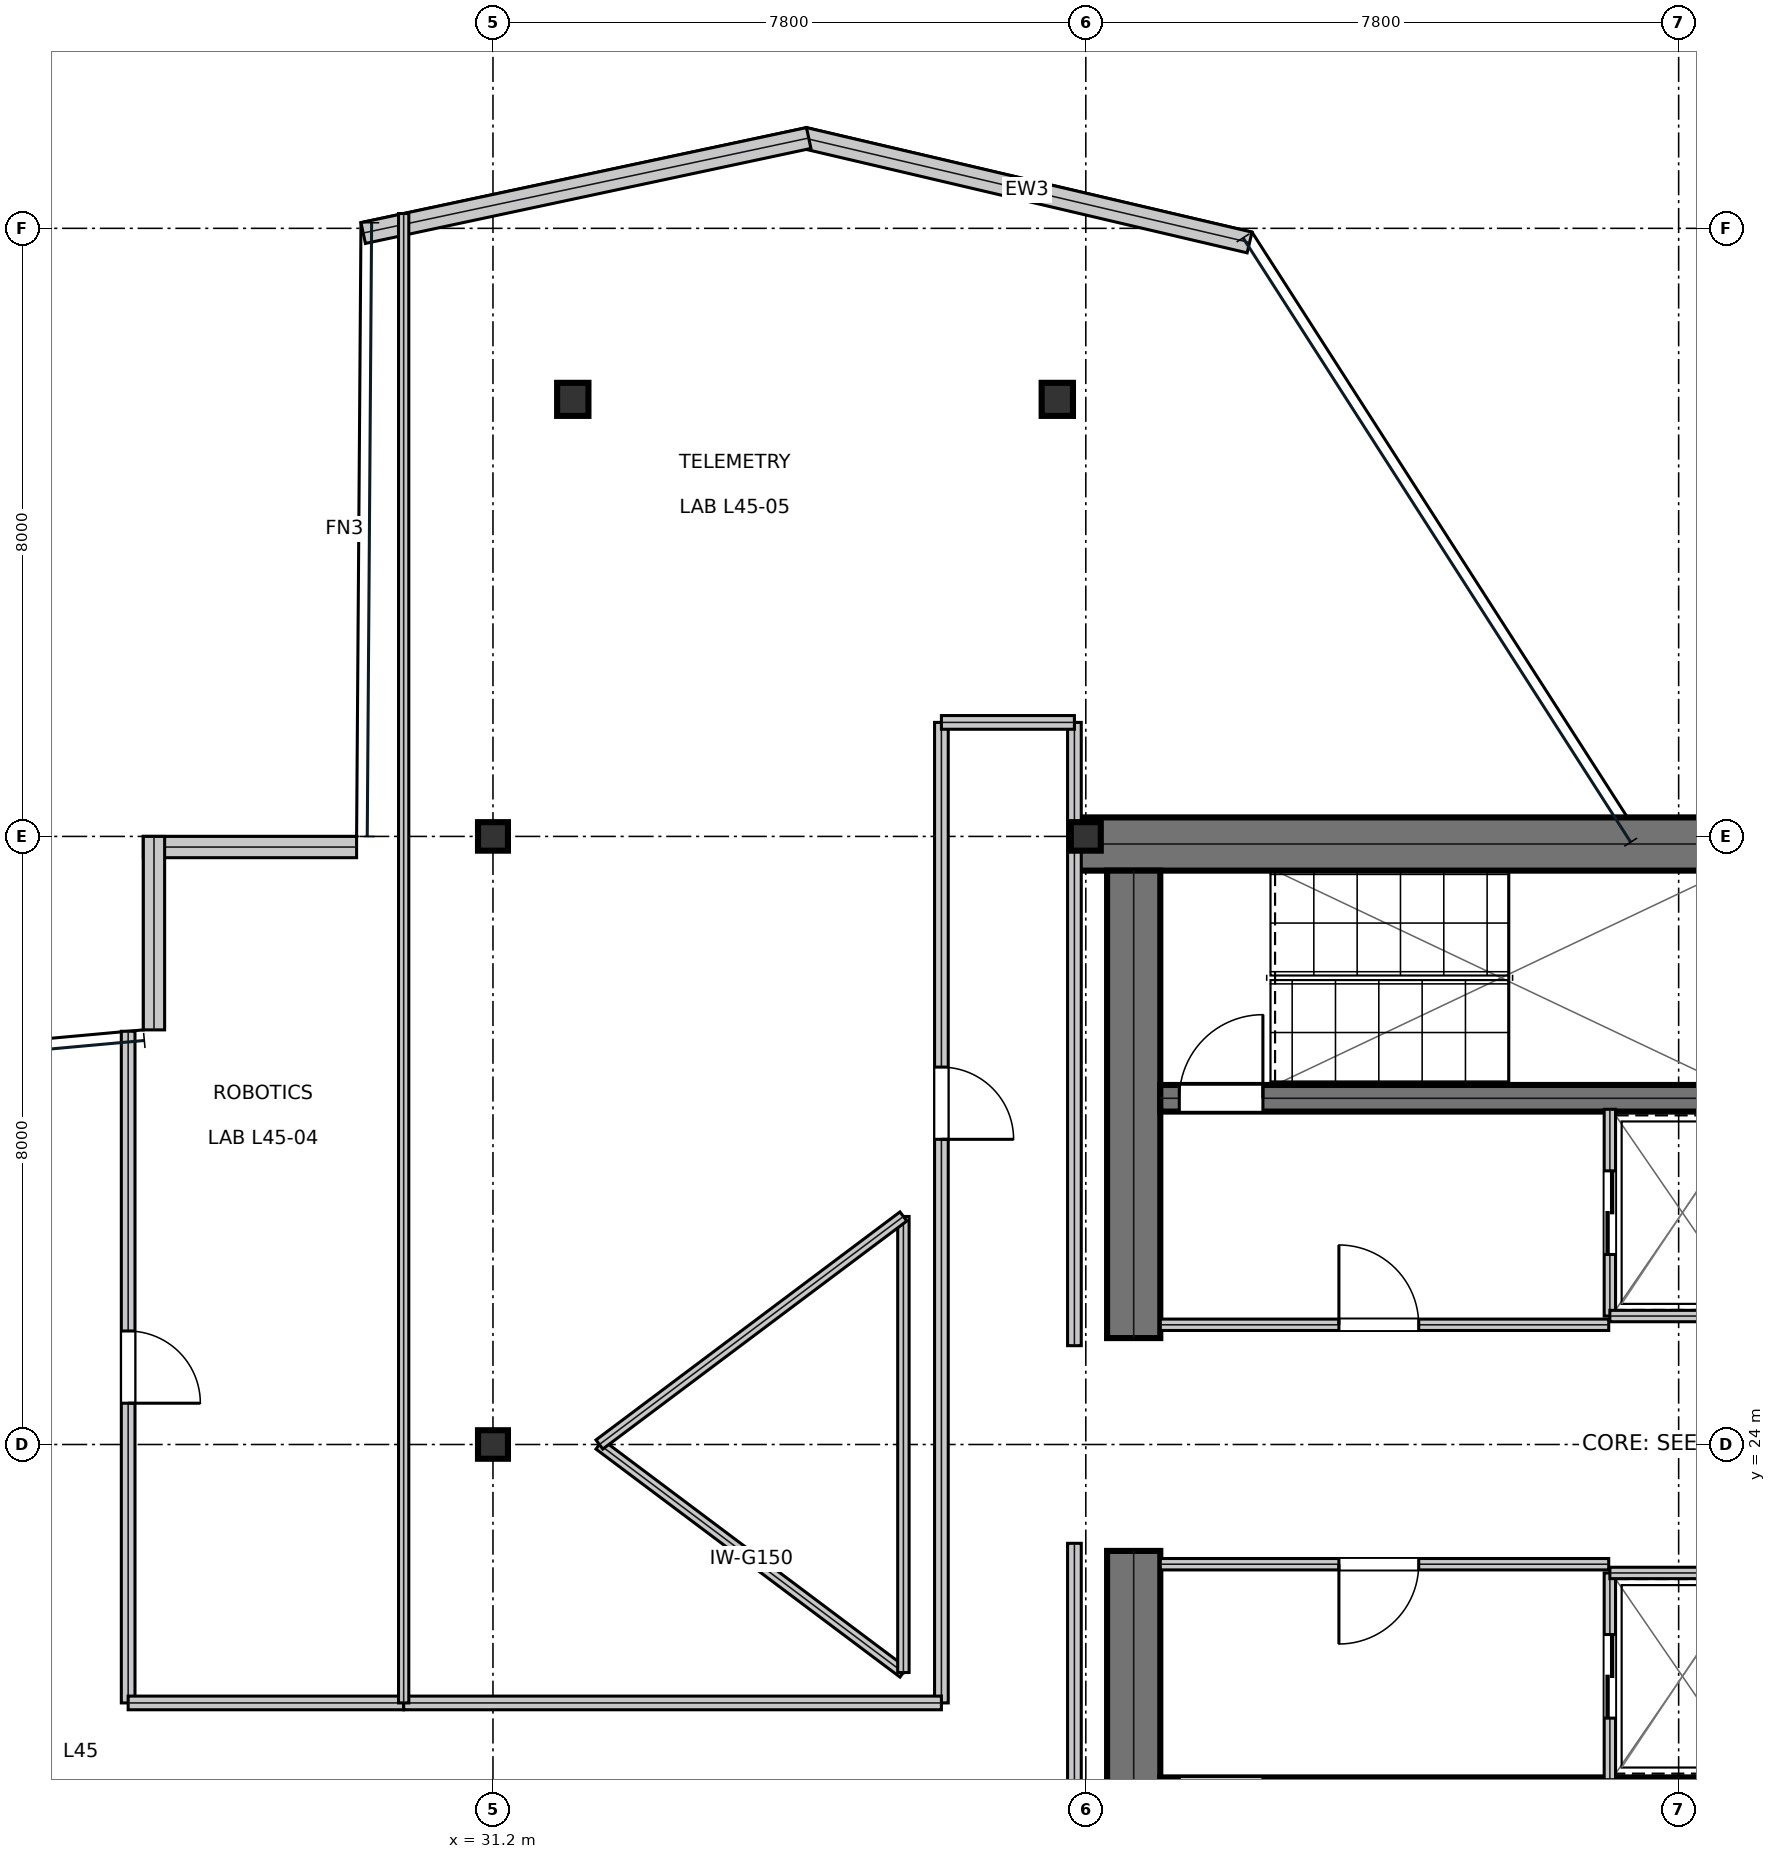
"""IFC4 building model, lengths in metres.
Left out: names, types, materials, properties, quantities, classifications, styles, units other than length and angle.
Written with IfcOpenShell. Run it as: python <this file> out.ifc"""

import sys

from ifc_helpers import new_model, si_unit, direction, frame, frame_2d, origin, origin_2d, place, context, subcontext, project, spatial, rectangle, i_section, extrude, element, fill, save


model = new_model("IFC4")
c1 = context("Model", 3, precision=1e-05, world=origin(), true_north=direction((0.0, 1.0)))
c2 = subcontext(c1, "Body", "Model", "MODEL_VIEW")
j1 = project(units=[si_unit("LENGTHUNIT", "METRE"), si_unit("PLANEANGLEUNIT", "RADIAN")], contexts=[c1])
p1 = place(None, origin())
s1 = spatial("IfcSite", under=j1, at=p1, CompositionType="ELEMENT")
p2 = place(p1, origin())
s2 = spatial("IfcBuilding", under=s1, at=p2, CompositionType="ELEMENT")
p3 = place(p2, frame((0.0, 0.0, 195.9)))
s3 = spatial("IfcBuildingStorey", under=s2, at=p3, CompositionType="ELEMENT", Elevation=195.9)
p4 = place(p3, frame((38.8, 31.9, 0.0), z_axis=(0.0, 0.0, 1.0), x_axis=(1.0, 0.0, 0.0)))
e1 = element("IfcWall", 1, at=p4, inside=s3, PredefinedType="SHEAR", context=c2, shape_type="SweptSolid", body=[
    extrude(rectangle(XDim=16.0, YDim=0.7, at=frame_2d((8.0, 0.0))), origin(), (0.0, 0.0, 1.0), 3.79),
])
for number, where, z_axis, x_axis in (
    (2, (39.63, 16.45, 0.0), (0.0, 0.0, 1.0), (0.0, 1.0, 0.0)),
    (3, (39.63, 25.4, 0.0), (0.0, 0.0, 1.0), (0.0, 1.0, 0.0)),
):
    element("IfcWall", number, at=place(p3, frame(where, z_axis=z_axis, x_axis=x_axis)), inside=s3, PredefinedType="SHEAR", context=c2, shape_type="SweptSolid", body=[
        extrude(rectangle(XDim=6.15, YDim=0.7, at=frame_2d((3.075, 0.0))), origin(), (0.0, 0.0, 1.0), 3.79),
    ])
p5 = place(p3, frame((39.98, 28.555, 0.0), z_axis=(0.0, 0.0, 1.0), x_axis=(1.0, 0.0, 0.0)))
e4 = element("IfcWall", 4, at=p5, inside=s3, PredefinedType="SHEAR", context=c2, shape_type="SweptSolid", body=[
    extrude(rectangle(XDim=7.71, YDim=0.35, at=frame_2d((3.855, 0.0))), origin(), (0.0, 0.0, 1.0), 3.79),
])
p6 = place(p5, frame((0.25, 0.0, 0.0)))
e5 = element("IfcOpeningElement", 5, at=p6, cuts=e4, PredefinedType="OPENING", context=c2, shape_type="SweptSolid", body=[
    extrude(rectangle(XDim=1.1, YDim=2.15, at=frame_2d((0.55, 1.075))), frame((0.0, 0.185, 0.0), z_axis=(0.0, -1.0, 0.0), x_axis=(1.0, 0.0, 0.0)), (0.0, 0.0, 1.0), 0.37),
])
p7 = place(p3, frame((39.98, 19.445, 0.0), z_axis=(0.0, 0.0, 1.0), x_axis=(1.0, 0.0, 0.0)))
e6 = element("IfcWall", 6, at=p7, inside=s3, PredefinedType="SHEAR", context=c2, shape_type="SweptSolid", body=[
    extrude(rectangle(XDim=7.71, YDim=0.35, at=frame_2d((3.855, 0.0))), origin(), (0.0, 0.0, 1.0), 3.79),
])
p8 = place(p7, frame((0.25, 0.0, 0.0)))
e7 = element("IfcOpeningElement", 7, at=p8, cuts=e6, PredefinedType="OPENING", context=c2, shape_type="SweptSolid", body=[
    extrude(rectangle(XDim=1.1, YDim=2.15, at=frame_2d((0.55, 1.075))), frame((0.0, 0.185, 0.0), z_axis=(0.0, -1.0, 0.0), x_axis=(1.0, 0.0, 0.0)), (0.0, 0.0, 1.0), 0.37),
])
for number, where, z_axis, x_axis in (
    (8, (31.2, 24.0, 0.0), (0.0, 0.0, 1.0), (1.0, 0.0, 0.0)),
    (9, (31.2, 32.0, 0.0), (0.0, 0.0, 1.0), (1.0, 0.0, 0.0)),
    (10, (39.0, 32.0, 0.0), (0.0, 0.0, 1.0), (1.0, 0.0, 0.0)),
):
    element("IfcColumn", number, at=place(p3, frame(where, z_axis=z_axis, x_axis=x_axis)), inside=s3, PredefinedType="COLUMN", context=c2, shape_type="SweptSolid", body=[
        extrude(i_section(OverallWidth=0.394, OverallDepth=0.375, WebThickness=0.017, FlangeThickness=0.028, at=origin_2d()), origin(), (0.0, 0.0, 1.0), 4.044),
    ])
for number, where, z_axis, x_axis in (
    (11, (32.25, 37.75, 0.016), (0.0, 0.0, 1.0), (1.0, 0.0, 0.0)),
    (12, (38.625, 37.75, 0.016), (0.0, 0.0, 1.0), (1.0, 0.0, 0.0)),
):
    element("IfcColumn", number, at=place(p3, frame(where, z_axis=z_axis, x_axis=x_axis)), inside=s3, PredefinedType="COLUMN", context=c2, shape_type="SweptSolid", body=[
        extrude(i_section(OverallWidth=0.412, OverallDepth=0.435, WebThickness=0.036, FlangeThickness=0.058, at=origin_2d()), origin(), (0.0, 0.0, 1.0), 4.018),
    ])
p9 = place(p3, frame((41.155, 39.814, 0.0), z_axis=(0.0, 0.0, 1.0), x_axis=(-0.973574347184, 0.228370292517, 0.0)))
e13 = element("IfcWall", 13, at=p9, inside=s3, PredefinedType="STANDARD", context=c2, shape_type="SweptSolid", body=[
    extrude(rectangle(XDim=6.021, YDim=0.28, at=frame_2d((3.01, 0.0))), origin(), (0.0, 0.0, 1.0), 3.79),
])
p10 = place(p3, frame((35.354, 41.188, 0.0), z_axis=(0.0, 0.0, 1.0), x_axis=(-0.978010564176, -0.208555355626, 0.0)))
e14 = element("IfcWall", 14, at=p10, inside=s3, PredefinedType="STANDARD", context=c2, shape_type="SweptSolid", body=[
    extrude(rectangle(XDim=5.994, YDim=0.28, at=frame_2d((2.997, 0.0))), origin(), (0.0, 0.0, 1.0), 3.79),
])
p11 = place(p3, frame((29.406, 31.86, 0.0), z_axis=(0.0, 0.0, 1.0), x_axis=(-1.0, 0.0, 0.0)))
e15 = element("IfcWall", 15, at=p11, inside=s3, PredefinedType="STANDARD", context=c2, shape_type="SweptSolid", body=[
    extrude(rectangle(XDim=2.806, YDim=0.28, at=frame_2d((1.403, 0.0))), origin(), (0.0, 0.0, 1.0), 3.79),
])
p12 = place(p3, frame((26.74, 32.0, 0.0), z_axis=(0.0, 0.0, 1.0), x_axis=(0.0, -1.0, 0.0)))
e16 = element("IfcWall", 16, at=p12, inside=s3, PredefinedType="STANDARD", context=c2, shape_type="SweptSolid", body=[
    extrude(rectangle(XDim=2.545, YDim=0.28, at=frame_2d((1.273, 0.0))), origin(), (0.0, 0.0, 1.0), 3.319),
])
p13 = place(p3, frame((39.98, 25.575, 0.0), z_axis=(0.0, 0.0, 1.0), x_axis=(1.0, 0.0, 0.0)))
e17 = element("IfcWall", 17, at=p13, inside=s3, PredefinedType="PARTITIONING", context=c2, shape_type="SweptSolid", body=[
    extrude(rectangle(XDim=5.9, YDim=0.15, at=frame_2d((2.95, 0.0))), origin(), (0.0, 0.0, 1.0), 3.79),
])
p14 = place(p13, frame((2.35, 0.0, 0.0)))
e18 = element("IfcOpeningElement", 18, at=p14, cuts=e17, PredefinedType="OPENING", context=c2, shape_type="SweptSolid", body=[
    extrude(rectangle(XDim=1.05, YDim=2.15, at=frame_2d((0.525, 1.075))), frame((0.0, 0.085, 0.0), z_axis=(0.0, -1.0, 0.0), x_axis=(1.0, 0.0, 0.0)), (0.0, 0.0, 1.0), 0.17),
])
p15 = place(p3, frame((39.98, 22.425, 0.0), z_axis=(0.0, 0.0, 1.0), x_axis=(1.0, 0.0, 0.0)))
e19 = element("IfcWall", 19, at=p15, inside=s3, PredefinedType="PARTITIONING", context=c2, shape_type="SweptSolid", body=[
    extrude(rectangle(XDim=5.9, YDim=0.15, at=frame_2d((2.95, 0.0))), origin(), (0.0, 0.0, 1.0), 3.79),
])
p16 = place(p15, frame((2.35, 0.0, 0.0)))
e20 = element("IfcOpeningElement", 20, at=p16, cuts=e19, PredefinedType="OPENING", context=c2, shape_type="SweptSolid", body=[
    extrude(rectangle(XDim=1.05, YDim=2.15, at=frame_2d((0.525, 1.075))), frame((0.0, 0.085, 0.0), z_axis=(0.0, -1.0, 0.0), x_axis=(1.0, 0.0, 0.0)), (0.0, 0.0, 1.0), 0.17),
])
p17 = place(p3, frame((45.895, 25.69, 0.0), z_axis=(0.0, 0.0, 1.0), x_axis=(0.0, 1.0, 0.0)))
e21 = element("IfcWall", 21, at=p17, inside=s3, PredefinedType="PARTITIONING", context=c2, shape_type="SweptSolid", body=[
    extrude(rectangle(XDim=2.72, YDim=0.15, at=frame_2d((1.36, 0.0))), origin(), (0.0, 0.0, 1.0), 3.79),
])
p18 = place(p17, frame((0.81, 0.0, 0.0)))
e22 = element("IfcOpeningElement", 22, at=p18, cuts=e21, PredefinedType="OPENING", context=c2, shape_type="SweptSolid", body=[
    extrude(rectangle(XDim=1.1, YDim=2.15, at=frame_2d((0.55, 1.075))), frame((0.0, 0.085, 0.0), z_axis=(0.0, -1.0, 0.0), x_axis=(1.0, 0.0, 0.0)), (0.0, 0.0, 1.0), 0.17),
])
p19 = place(p3, frame((45.895, 25.69, 0.0), z_axis=(0.0, 0.0, 1.0), x_axis=(1.0, 0.0, 0.0)))
e23 = element("IfcWall", 23, at=p19, inside=s3, PredefinedType="PARTITIONING", context=c2, shape_type="SweptSolid", body=[
    extrude(rectangle(XDim=1.915, YDim=0.15, at=frame_2d((0.958, 0.0))), origin(), (0.0, 0.0, 1.0), 3.79),
])
p20 = place(p3, frame((45.895, 19.59, 0.0), z_axis=(0.0, 0.0, 1.0), x_axis=(0.0, 1.0, 0.0)))
e24 = element("IfcWall", 24, at=p20, inside=s3, PredefinedType="PARTITIONING", context=c2, shape_type="SweptSolid", body=[
    extrude(rectangle(XDim=2.72, YDim=0.15, at=frame_2d((1.36, 0.0))), origin(), (0.0, 0.0, 1.0), 3.79),
])
p21 = place(p20, frame((0.81, 0.0, 0.0)))
e25 = element("IfcOpeningElement", 25, at=p21, cuts=e24, PredefinedType="OPENING", context=c2, shape_type="SweptSolid", body=[
    extrude(rectangle(XDim=1.1, YDim=2.15, at=frame_2d((0.55, 1.075))), frame((0.0, 0.085, 0.0), z_axis=(0.0, -1.0, 0.0), x_axis=(1.0, 0.0, 0.0)), (0.0, 0.0, 1.0), 0.17),
])
p22 = place(p3, frame((45.895, 22.31, 0.0), z_axis=(0.0, 0.0, 1.0), x_axis=(1.0, 0.0, 0.0)))
e26 = element("IfcWall", 26, at=p22, inside=s3, PredefinedType="PARTITIONING", context=c2, shape_type="SweptSolid", body=[
    extrude(rectangle(XDim=1.915, YDim=0.15, at=frame_2d((0.958, 0.0))), origin(), (0.0, 0.0, 1.0), 3.79),
])
p23 = place(p3, frame((26.4, 20.6, 0.0), z_axis=(0.0, 0.0, 1.0), x_axis=(0.0, 1.0, 0.0)))
e27 = element("IfcWall", 27, at=p23, inside=s3, PredefinedType="SOLIDWALL", context=c2, shape_type="SweptSolid", body=[
    extrude(rectangle(XDim=8.836, YDim=0.18, at=frame_2d((4.418, 0.0))), origin(), (0.0, 0.0, 1.0), 3.241),
])
p24 = place(p23, frame((3.943, 0.0, 0.0)))
e28 = element("IfcOpeningElement", 28, at=p24, cuts=e27, PredefinedType="OPENING", context=c2, shape_type="SweptSolid", body=[
    extrude(rectangle(XDim=0.95, YDim=2.15, at=frame_2d((0.475, 1.075))), frame((0.0, 0.1, 0.0), z_axis=(0.0, -1.0, 0.0), x_axis=(1.0, 0.0, 0.0)), (0.0, 0.0, 1.0), 0.2),
])
p25 = place(p3, frame((37.1, 20.6, 0.0), z_axis=(0.0, 0.0, 1.0), x_axis=(0.0, 1.0, 0.0)))
e29 = element("IfcWall", 29, at=p25, inside=s3, PredefinedType="SOLIDWALL", context=c2, shape_type="SweptSolid", body=[
    extrude(rectangle(XDim=12.9, YDim=0.18, at=frame_2d((6.45, 0.0))), origin(), (0.0, 0.0, 1.0), 3.241),
])
p26 = place(p25, frame((7.415, 0.0, 0.0)))
e30 = element("IfcOpeningElement", 30, at=p26, cuts=e29, PredefinedType="OPENING", context=c2, shape_type="SweptSolid", body=[
    extrude(rectangle(XDim=0.95, YDim=2.15, at=frame_2d((0.475, 1.075))), frame((0.0, 0.1, 0.0), z_axis=(0.0, -1.0, 0.0), x_axis=(1.0, 0.0, 0.0)), (0.0, 0.0, 1.0), 0.2),
])
p27 = place(p3, frame((38.85, 14.5, 0.0), z_axis=(0.0, 0.0, 1.0), x_axis=(0.0, 1.0, 0.0)))
e31 = element("IfcWall", 31, at=p27, inside=s3, PredefinedType="SOLIDWALL", context=c2, shape_type="SweptSolid", body=[
    extrude(rectangle(XDim=8.2, YDim=0.18, at=frame_2d((4.1, 0.0))), origin(), (0.0, 0.0, 1.0), 3.241),
])
p28 = place(p3, frame((26.4, 20.6, 0.0), z_axis=(0.0, 0.0, 1.0), x_axis=(1.0, 0.0, 0.0)))
e32 = element("IfcWall", 32, at=p28, inside=s3, PredefinedType="SOLIDWALL", context=c2, shape_type="SweptSolid", body=[
    extrude(rectangle(XDim=3.625, YDim=0.18, at=frame_2d((1.812, 0.0))), origin(), (0.0, 0.0, 1.0), 3.79),
])
p29 = place(p3, frame((38.85, 25.3, 0.0), z_axis=(0.0, 0.0, 1.0), x_axis=(0.0, 1.0, 0.0)))
e33 = element("IfcWall", 33, at=p29, inside=s3, PredefinedType="SOLIDWALL", context=c2, shape_type="SweptSolid", body=[
    extrude(rectangle(XDim=8.2, YDim=0.18, at=frame_2d((4.1, 0.0))), origin(), (0.0, 0.0, 1.0), 3.241),
])
p30 = place(p3, frame((30.025, 20.6, 0.0), z_axis=(0.0, 0.0, 1.0), x_axis=(1.0, 0.0, 0.0)))
e34 = element("IfcWall", 34, at=p30, inside=s3, PredefinedType="SOLIDWALL", context=c2, shape_type="SweptSolid", body=[
    extrude(rectangle(XDim=7.075, YDim=0.18, at=frame_2d((3.538, 0.0))), origin(), (0.0, 0.0, 1.0), 3.241),
])
p31 = place(p3, frame((37.1, 33.5, 0.0), z_axis=(0.0, 0.0, 1.0), x_axis=(1.0, 0.0, 0.0)))
e35 = element("IfcWall", 35, at=p31, inside=s3, PredefinedType="SOLIDWALL", context=c2, shape_type="SweptSolid", body=[
    extrude(rectangle(XDim=1.75, YDim=0.18, at=frame_2d((0.875, 0.0))), origin(), (0.0, 0.0, 1.0), 3.241),
])
p32 = place(p3, frame((30.025, 20.6, 0.0), z_axis=(0.0, 0.0, 1.0), x_axis=(0.0, 1.0, 0.0)))
e36 = element("IfcWall", 36, at=p32, inside=s3, PredefinedType="PARTITIONING", context=c2, shape_type="SweptSolid", body=[
    extrude(rectangle(XDim=19.595, YDim=0.135, at=frame_2d((9.797, 0.0))), origin(), (0.0, 0.0, 1.0), 3.241),
])
p33 = place(p3, frame((32.6, 24.0, 0.0), z_axis=(0.0, 0.0, 1.0), x_axis=(0.8, -0.6, 0.0)))
e37 = element("IfcWall", 37, at=p33, inside=s3, PredefinedType="MOVABLE", context=c2, shape_type="SweptSolid", body=[
    extrude(rectangle(XDim=5.0, YDim=0.15, at=frame_2d((2.5, 0.0))), origin(), (0.0, 0.0, 1.0), 3.79),
])
p34 = place(p3, frame((36.6, 21.0, 0.0), z_axis=(0.0, 0.0, 1.0), x_axis=(0.0, 1.0, 0.0)))
e38 = element("IfcWall", 38, at=p34, inside=s3, PredefinedType="MOVABLE", context=c2, shape_type="SweptSolid", body=[
    extrude(rectangle(XDim=6.0, YDim=0.15, at=frame_2d((3.0, 0.0))), origin(), (0.0, 0.0, 1.0), 3.79),
])
p35 = place(p3, frame((36.6, 27.0, 0.0), z_axis=(0.0, 0.0, 1.0), x_axis=(-0.8, -0.6, 0.0)))
e39 = element("IfcWall", 39, at=p35, inside=s3, PredefinedType="MOVABLE", context=c2, shape_type="SweptSolid", body=[
    extrude(rectangle(XDim=5.0, YDim=0.15, at=frame_2d((2.5, 0.0))), origin(), (0.0, 0.0, 1.0), 3.79),
])
p36 = place(p14, origin())
e40 = element("IfcDoor", 40, at=p36, inside=s3, OperationType="SINGLE_SWING_LEFT", PredefinedType="DOOR", context=c2, shape_type="SweptSolid", body=[
    extrude(rectangle(XDim=1.05, YDim=2.15, at=frame_2d((0.525, 1.075))), frame((0.0, 0.025, 0.0), z_axis=(0.0, -1.0, 0.0), x_axis=(1.0, 0.0, 0.0)), (0.0, 0.0, 1.0), 0.05),
])
fill(e18, e40)
p37 = place(p16, frame((1.05, 0.0, 0.0), z_axis=(0.0, 0.0, 1.0), x_axis=(-1.0, 0.0, 0.0)))
e41 = element("IfcDoor", 41, at=p37, inside=s3, OperationType="SINGLE_SWING_RIGHT", PredefinedType="DOOR", context=c2, shape_type="SweptSolid", body=[
    extrude(rectangle(XDim=1.05, YDim=2.15, at=frame_2d((0.525, 1.075))), frame((0.0, 0.025, 0.0), z_axis=(0.0, -1.0, 0.0), x_axis=(1.0, 0.0, 0.0)), (0.0, 0.0, 1.0), 0.05),
])
fill(e20, e41)
p38 = place(p18, frame((1.1, 0.0, 0.0), z_axis=(0.0, 0.0, 1.0), x_axis=(-1.0, 0.0, 0.0)))
e42 = element("IfcDoor", 42, at=p38, inside=s3, OperationType="DOUBLE_DOOR_SLIDING", PredefinedType="DOOR", context=c2, shape_type="SweptSolid", body=[
    extrude(rectangle(XDim=1.1, YDim=2.15, at=frame_2d((0.55, 1.075))), frame((0.0, 0.025, 0.0), z_axis=(0.0, -1.0, 0.0), x_axis=(1.0, 0.0, 0.0)), (0.0, 0.0, 1.0), 0.05),
])
fill(e22, e42)
p39 = place(p21, frame((1.1, 0.0, 0.0), z_axis=(0.0, 0.0, 1.0), x_axis=(-1.0, 0.0, 0.0)))
e43 = element("IfcDoor", 43, at=p39, inside=s3, OperationType="DOUBLE_DOOR_SLIDING", PredefinedType="DOOR", context=c2, shape_type="SweptSolid", body=[
    extrude(rectangle(XDim=1.1, YDim=2.15, at=frame_2d((0.55, 1.075))), frame((0.0, 0.025, 0.0), z_axis=(0.0, -1.0, 0.0), x_axis=(1.0, 0.0, 0.0)), (0.0, 0.0, 1.0), 0.05),
])
fill(e25, e43)
p40 = place(p24, frame((0.95, 0.0, 0.0), z_axis=(0.0, 0.0, 1.0), x_axis=(-1.0, 0.0, 0.0)))
e44 = element("IfcDoor", 44, at=p40, inside=s3, OperationType="SINGLE_SWING_RIGHT", PredefinedType="DOOR", context=c2, shape_type="SweptSolid", body=[
    extrude(rectangle(XDim=0.95, YDim=2.15, at=frame_2d((0.475, 1.075))), frame((0.0, 0.025, 0.0), z_axis=(0.0, -1.0, 0.0), x_axis=(1.0, 0.0, 0.0)), (0.0, 0.0, 1.0), 0.05),
])
fill(e28, e44)
p41 = place(p26, frame((0.95, 0.0, 0.0), z_axis=(0.0, 0.0, 1.0), x_axis=(-1.0, 0.0, 0.0)))
e45 = element("IfcDoor", 45, at=p41, inside=s3, OperationType="SINGLE_SWING_RIGHT", PredefinedType="DOOR", context=c2, shape_type="SweptSolid", body=[
    extrude(rectangle(XDim=0.95, YDim=2.15, at=frame_2d((0.475, 1.075))), frame((0.0, 0.025, 0.0), z_axis=(0.0, -1.0, 0.0), x_axis=(1.0, 0.0, 0.0)), (0.0, 0.0, 1.0), 0.05),
])
fill(e30, e45)
p42 = place(p6, origin())
e46 = element("IfcDoor", 46, at=p42, inside=s3, OperationType="SINGLE_SWING_RIGHT", PredefinedType="DOOR", context=c2, shape_type="SweptSolid", body=[
    extrude(rectangle(XDim=1.1, YDim=2.15, at=frame_2d((0.55, 1.075))), frame((0.0, 0.025, 0.0), z_axis=(0.0, -1.0, 0.0), x_axis=(1.0, 0.0, 0.0)), (0.0, 0.0, 1.0), 0.05),
])
fill(e5, e46)
save(model, sys.argv[1])
